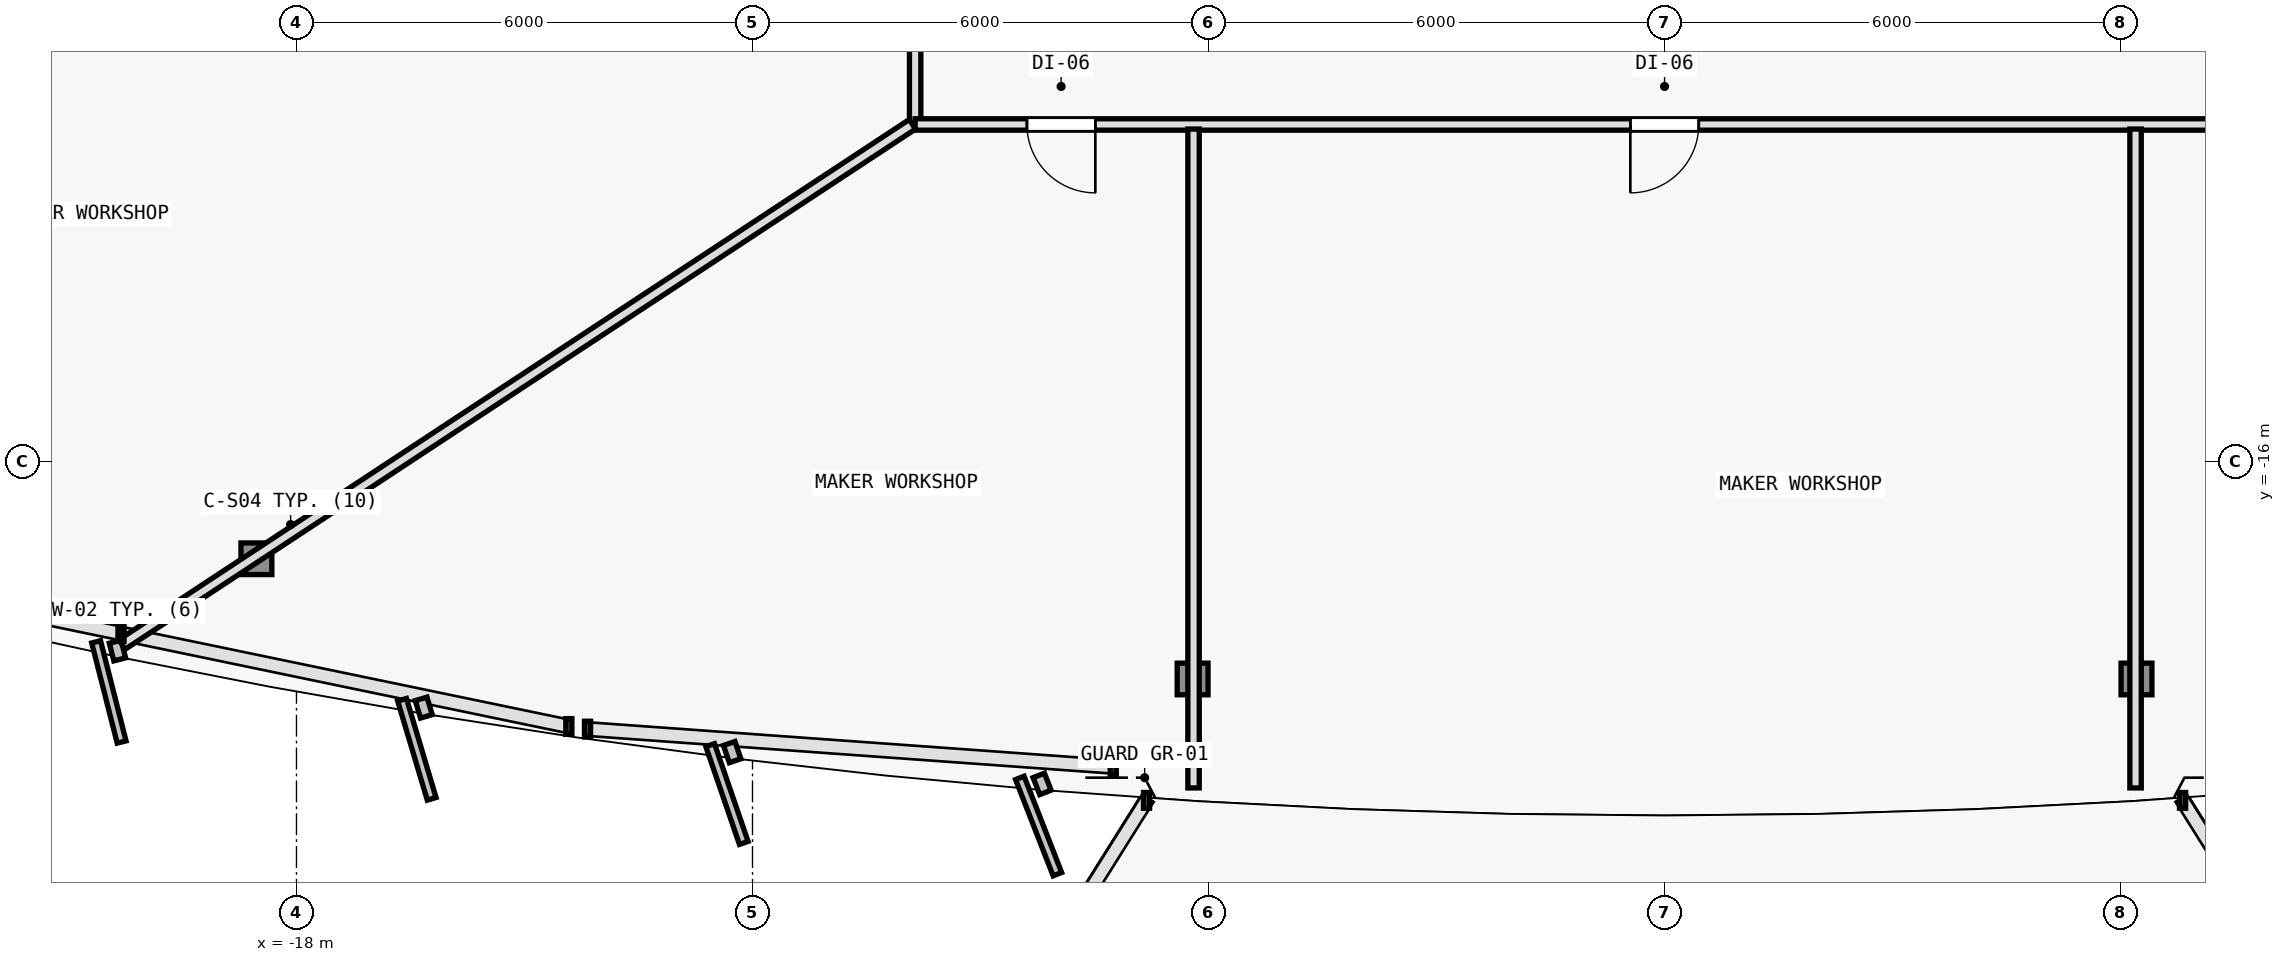
"""IFC4 building model, lengths in metres.
Left out: names, types, materials, properties, quantities, classifications, styles, units other than length and angle.
Written with IfcOpenShell. Run it as: python <this file> out.ifc"""

import sys

from ifc_helpers import new_model, si_unit, direction, frame, frame_2d, origin, origin_2d, place, context, subcontext, project, spatial, rectangle, i_section, extrude, element, fill, save


model = new_model("IFC4")
c1 = context("Model", 3, precision=1e-05, world=origin(), true_north=direction((0.0, 1.0)))
c2 = subcontext(c1, "Body", "Model", "MODEL_VIEW")
j1 = project(units=[si_unit("LENGTHUNIT", "METRE"), si_unit("PLANEANGLEUNIT", "RADIAN")], contexts=[c1])
p1 = place(None, origin())
s1 = spatial("IfcSite", under=j1, at=p1, CompositionType="ELEMENT")
p2 = place(p1, origin())
s2 = spatial("IfcBuilding", under=s1, at=p2, CompositionType="ELEMENT")
p3 = place(p2, frame((0.0, 0.0, 118.5)))
s3 = spatial("IfcBuildingStorey", under=s2, at=p3, CompositionType="ELEMENT", Elevation=118.5)
p4 = place(p3, frame((-18.527, -17.274, 0.006), z_axis=(0.020664238418, 0.033511412961, 0.999224686671), x_axis=(-0.851183725565, 0.524867855115, 0.0)))
e1 = element("IfcColumn", 1, at=p4, inside=s3, PredefinedType="COLUMN", context=c2, shape_type="SweptSolid", body=[
    extrude(i_section(OverallWidth=0.406, OverallDepth=0.416, WebThickness=0.019, FlangeThickness=0.031, FilletRadius=0.015, at=origin_2d()), origin(), (0.0, 0.0, 1.0), 3.592),
])
for number, where, z_axis, x_axis in (
    (2, (-6.209, -18.855, 0.006), (0.007, 0.035, 0.999), (-0.981, 0.193, 0.0)),
    (3, (6.209, -18.855, 0.006), (-0.007, 0.035, 0.999), (-0.981, -0.193, 0.0)),
):
    element("IfcColumn", number, at=place(p3, frame(where, z_axis=z_axis, x_axis=x_axis)), inside=s3, PredefinedType="COLUMN", context=c2, shape_type="SweptSolid", body=[
        extrude(i_section(OverallWidth=0.406, OverallDepth=0.416, WebThickness=0.019, FlangeThickness=0.031, FilletRadius=0.015, at=origin_2d()), origin(), (0.0, 0.0, 1.0), 3.591),
    ])
p5 = place(p3, frame((-9.86, -11.56, 0.0), z_axis=(0.0, 0.0, 1.0), x_axis=(0.0, 1.0, 0.0)))
e4 = element("IfcWall", 4, at=p5, inside=s3, PredefinedType="PARTITIONING", context=c2, shape_type="SweptSolid", body=[
    extrude(rectangle(XDim=19.986, YDim=0.15, at=frame_2d((9.993, 0.0))), origin(), (0.0, 0.0, 1.0), 2.705),
])
p6 = place(p5, frame((11.261, 0.0, 0.0)))
e5 = element("IfcOpeningElement", 5, at=p6, cuts=e4, PredefinedType="OPENING", context=c2, shape_type="SweptSolid", body=[
    extrude(rectangle(XDim=0.85, YDim=2.1, at=frame_2d((0.425, 1.05))), frame((0.0, 0.085, 0.0), z_axis=(0.0, -1.0, 0.0), x_axis=(1.0, 0.0, 0.0)), (0.0, 0.0, 1.0), 0.17),
])
p7 = place(p5, frame((9.802, 0.0, 0.0)))
e6 = element("IfcOpeningElement", 6, at=p7, cuts=e4, PredefinedType="OPENING", context=c2, shape_type="SweptSolid", body=[
    extrude(rectangle(XDim=0.85, YDim=2.1, at=frame_2d((0.425, 1.05))), frame((0.0, 0.085, 0.0), z_axis=(0.0, -1.0, 0.0), x_axis=(1.0, 0.0, 0.0)), (0.0, 0.0, 1.0), 0.17),
])
p8 = place(p5, frame((8.25, 0.0, 0.0)))
e7 = element("IfcOpeningElement", 7, at=p8, cuts=e4, PredefinedType="OPENING", context=c2, shape_type="SweptSolid", body=[
    extrude(rectangle(XDim=0.85, YDim=2.1, at=frame_2d((0.425, 1.05))), frame((0.0, 0.085, 0.0), z_axis=(0.0, -1.0, 0.0), x_axis=(1.0, 0.0, 0.0)), (0.0, 0.0, 1.0), 0.17),
])
p9 = place(p5, frame((6.754, 0.0, 0.0)))
e8 = element("IfcOpeningElement", 8, at=p9, cuts=e4, PredefinedType="OPENING", context=c2, shape_type="SweptSolid", body=[
    extrude(rectangle(XDim=0.85, YDim=2.1, at=frame_2d((0.425, 1.05))), frame((0.0, 0.085, 0.0), z_axis=(0.0, -1.0, 0.0), x_axis=(1.0, 0.0, 0.0)), (0.0, 0.0, 1.0), 0.17),
])
p10 = place(p5, frame((5.369, 0.0, 0.0)))
e9 = element("IfcOpeningElement", 9, at=p10, cuts=e4, PredefinedType="OPENING", context=c2, shape_type="SweptSolid", body=[
    extrude(rectangle(XDim=0.85, YDim=2.1, at=frame_2d((0.425, 1.05))), frame((0.0, 0.085, 0.0), z_axis=(0.0, -1.0, 0.0), x_axis=(1.0, 0.0, 0.0)), (0.0, 0.0, 1.0), 0.17),
])
p11 = place(p5, frame((3.948, 0.0, 0.0)))
e10 = element("IfcOpeningElement", 10, at=p11, cuts=e4, PredefinedType="OPENING", context=c2, shape_type="SweptSolid", body=[
    extrude(rectangle(XDim=0.85, YDim=2.1, at=frame_2d((0.425, 1.05))), frame((0.0, 0.085, 0.0), z_axis=(0.0, -1.0, 0.0), x_axis=(1.0, 0.0, 0.0)), (0.0, 0.0, 1.0), 0.17),
])
p12 = place(p5, frame((1.465, 0.0, 0.0)))
e11 = element("IfcOpeningElement", 11, at=p12, cuts=e4, PredefinedType="OPENING", context=c2, shape_type="SweptSolid", body=[
    extrude(rectangle(XDim=0.9, YDim=2.1, at=frame_2d((0.45, 1.05))), frame((0.0, 0.085, 0.0), z_axis=(0.0, -1.0, 0.0), x_axis=(1.0, 0.0, 0.0)), (0.0, 0.0, 1.0), 0.17),
])
p13 = place(p5, frame((13.047, 0.0, 0.0)))
e12 = element("IfcOpeningElement", 12, at=p13, cuts=e4, PredefinedType="OPENING", context=c2, shape_type="SweptSolid", body=[
    extrude(rectangle(XDim=0.9, YDim=2.1, at=frame_2d((0.45, 1.05))), frame((0.0, 0.085, 0.0), z_axis=(0.0, -1.0, 0.0), x_axis=(1.0, 0.0, 0.0)), (0.0, 0.0, 1.0), 0.17),
])
p14 = place(p3, frame((13.18, -11.56, 0.0), z_axis=(0.0, 0.0, 1.0), x_axis=(-1.0, 0.0, 0.0)))
e13 = element("IfcWall", 13, at=p14, inside=s3, PredefinedType="PARTITIONING", context=c2, shape_type="SweptSolid", body=[
    extrude(rectangle(XDim=23.04, YDim=0.15, at=frame_2d((11.52, 0.0))), origin(), (0.0, 0.0, 1.0), 2.725),
])
p15 = place(p14, frame((20.669, 0.0, 0.0)))
e14 = element("IfcOpeningElement", 14, at=p15, cuts=e13, PredefinedType="OPENING", context=c2, shape_type="SweptSolid", body=[
    extrude(rectangle(XDim=0.9, YDim=2.1, at=frame_2d((0.45, 1.05))), frame((0.0, 0.085, 0.0), z_axis=(0.0, -1.0, 0.0), x_axis=(1.0, 0.0, 0.0)), (0.0, 0.0, 1.0), 0.17),
])
p16 = place(p14, frame((12.73, 0.0, 0.0)))
e15 = element("IfcOpeningElement", 15, at=p16, cuts=e13, PredefinedType="OPENING", context=c2, shape_type="SweptSolid", body=[
    extrude(rectangle(XDim=0.9, YDim=2.1, at=frame_2d((0.45, 1.05))), frame((0.0, 0.085, 0.0), z_axis=(0.0, -1.0, 0.0), x_axis=(1.0, 0.0, 0.0)), (0.0, 0.0, 1.0), 0.17),
])
p17 = place(p14, frame((3.131, 0.0, 0.0)))
e16 = element("IfcOpeningElement", 16, at=p17, cuts=e13, PredefinedType="OPENING", context=c2, shape_type="SweptSolid", body=[
    extrude(rectangle(XDim=0.9, YDim=2.1, at=frame_2d((0.45, 1.05))), frame((0.0, 0.085, 0.0), z_axis=(0.0, -1.0, 0.0), x_axis=(1.0, 0.0, 0.0)), (0.0, 0.0, 1.0), 0.17),
])
p18 = place(p3, frame((-9.896, -11.558, 0.0), z_axis=(0.0, 0.0, 1.0), x_axis=(-0.835324414442, -0.54975733068, 0.0)))
e17 = element("IfcWall", 17, at=p18, inside=s3, PredefinedType="PARTITIONING", context=c2, shape_type="SweptSolid", body=[
    extrude(rectangle(XDim=12.449, YDim=0.15, at=frame_2d((6.224, 0.0))), origin(), (0.0, 0.0, 1.0), 2.775),
])
p19 = place(p3, frame((-6.197, -11.62, 0.0), z_axis=(0.0, 0.0, 1.0), x_axis=(0.0, -1.0, 0.0)))
e18 = element("IfcWall", 18, at=p19, inside=s3, PredefinedType="PARTITIONING", context=c2, shape_type="SweptSolid", body=[
    extrude(rectangle(XDim=8.668, YDim=0.15, at=frame_2d((4.334, 0.0))), origin(), (0.0, 0.0, 1.0), 2.775),
])
p20 = place(p3, frame((6.197, -11.62, 0.0), z_axis=(0.0, 0.0, 1.0), x_axis=(0.0, -1.0, 0.0)))
e19 = element("IfcWall", 19, at=p20, inside=s3, PredefinedType="PARTITIONING", context=c2, shape_type="SweptSolid", body=[
    extrude(rectangle(XDim=8.668, YDim=0.15, at=frame_2d((4.334, 0.0))), origin(), (0.0, 0.0, 1.0), 2.725),
])
p21 = place(p15, origin())
e20 = element("IfcDoor", 20, at=p21, inside=s3, OperationType="SINGLE_SWING_LEFT", PredefinedType="DOOR", context=c2, shape_type="SweptSolid", body=[
    extrude(rectangle(XDim=0.9, YDim=2.1, at=frame_2d((0.45, 1.05))), frame((0.0, 0.025, 0.0), z_axis=(0.0, -1.0, 0.0), x_axis=(1.0, 0.0, 0.0)), (0.0, 0.0, 1.0), 0.05),
])
fill(e14, e20)
p22 = place(p16, origin())
e21 = element("IfcDoor", 21, at=p22, inside=s3, OperationType="SINGLE_SWING_RIGHT", PredefinedType="DOOR", context=c2, shape_type="SweptSolid", body=[
    extrude(rectangle(XDim=0.9, YDim=2.1, at=frame_2d((0.45, 1.05))), frame((0.0, 0.025, 0.0), z_axis=(0.0, -1.0, 0.0), x_axis=(1.0, 0.0, 0.0)), (0.0, 0.0, 1.0), 0.05),
])
fill(e15, e21)
save(model, sys.argv[1])
